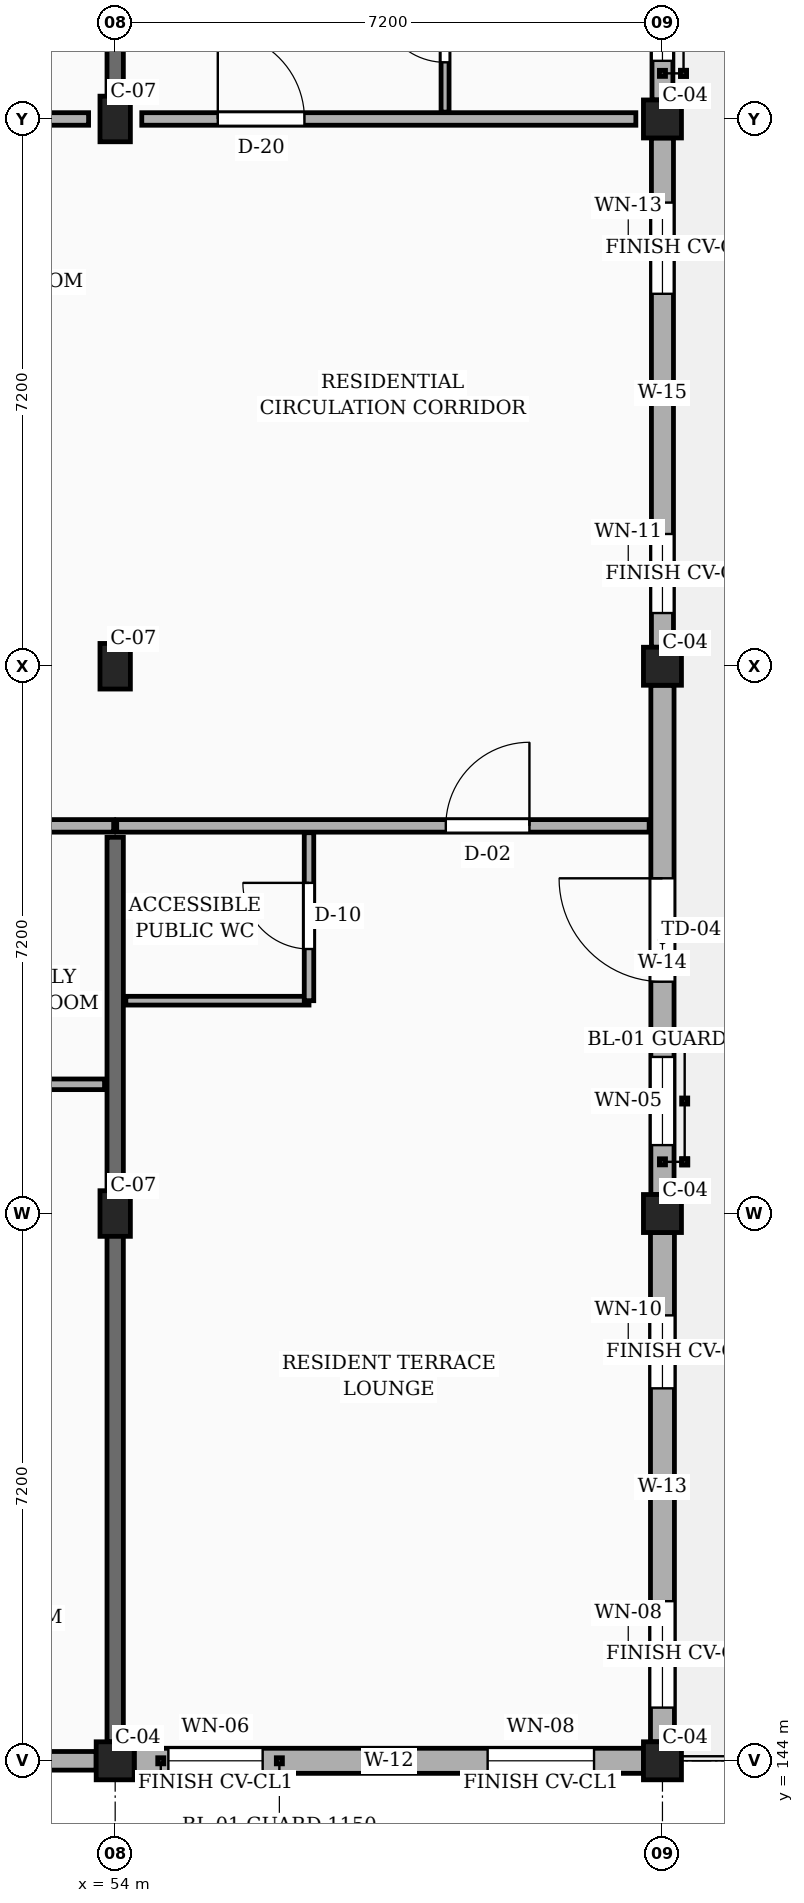
"""IFC4 building model, lengths in metres.
Left out: names, types, materials, properties, quantities, classifications, styles, units other than length and angle.
Written with IfcOpenShell. Run it as: python <this file> out.ifc"""

import sys

from ifc_helpers import new_model, si_unit, direction, frame, frame_2d, origin, origin_2d, place, context, subcontext, project, spatial, rectangle, extrude, element, fill, save


model = new_model("IFC4")
c1 = context("Model", 3, precision=1e-05, world=origin(), true_north=direction((0.0, 1.0)))
c2 = subcontext(c1, "Body", "Model", "MODEL_VIEW")
j1 = project(units=[si_unit("LENGTHUNIT", "METRE"), si_unit("PLANEANGLEUNIT", "RADIAN")], contexts=[c1])
p1 = place(None, origin())
s1 = spatial("IfcSite", under=j1, at=p1, CompositionType="ELEMENT")
p2 = place(p1, origin())
s2 = spatial("IfcBuilding", under=s1, at=p2, CompositionType="ELEMENT")
p3 = place(p2, frame((0.0, 0.0, 26.55)))
s3 = spatial("IfcBuildingStorey", under=s2, at=p3, CompositionType="ELEMENT", Elevation=26.55)
p4 = place(p3, frame((54.0, 144.0, 0.0), z_axis=(0.0, 0.0, 1.0), x_axis=(1.0, 0.0, 0.0)))
e1 = element("IfcColumn", 1, at=p4, inside=s3, PredefinedType="COLUMN", context=c2, shape_type="SweptSolid", body=[
    extrude(rectangle(XDim=0.5, YDim=0.5, at=origin_2d()), origin(), (0.0, 0.0, 1.0), 3.15),
])
for number, where, z_axis, x_axis in (
    (2, (54.0, 151.2, 0.0), (0.0, 0.0, 1.0), (1.0, 0.0, 0.0)),
    (3, (54.0, 158.4, 0.0), (0.0, 0.0, 1.0), (1.0, 0.0, 0.0)),
    (4, (54.0, 165.6, 0.0), (0.0, 0.0, 1.0), (1.0, 0.0, 0.0)),
):
    element("IfcColumn", number, at=place(p3, frame(where, z_axis=z_axis, x_axis=x_axis)), inside=s3, PredefinedType="COLUMN", context=c2, shape_type="SweptSolid", body=[
        extrude(rectangle(XDim=0.4, YDim=0.6, at=origin_2d()), origin(), (0.0, 0.0, 1.0), 3.15),
    ])
for number, where, z_axis, x_axis in (
    (5, (61.2, 144.0, 0.0), (0.0, 0.0, 1.0), (1.0, 0.0, 0.0)),
    (6, (61.2, 151.2, 0.0), (0.0, 0.0, 1.0), (1.0, 0.0, 0.0)),
    (7, (61.2, 158.4, 0.0), (0.0, 0.0, 1.0), (1.0, 0.0, 0.0)),
    (8, (61.2, 165.6, 0.0), (0.0, 0.0, 1.0), (1.0, 0.0, 0.0)),
):
    element("IfcColumn", number, at=place(p3, frame(where, z_axis=z_axis, x_axis=x_axis)), inside=s3, PredefinedType="COLUMN", context=c2, shape_type="SweptSolid", body=[
        extrude(rectangle(XDim=0.5, YDim=0.5, at=origin_2d()), origin(), (0.0, 0.0, 1.0), 3.15),
    ])
p5 = place(p3, frame((54.0, 144.25, 0.0), z_axis=(0.0, 0.0, 1.0), x_axis=(0.0, 1.0, 0.0)))
e9 = element("IfcWall", 9, at=p5, inside=s3, PredefinedType="SOLIDWALL", context=c2, shape_type="SweptSolid", body=[
    extrude(rectangle(XDim=11.9, YDim=0.215, at=frame_2d((5.95, 0.0))), origin(), (0.0, 0.0, 1.0), 2.185),
])
p6 = place(p3, frame((54.0, 165.9, 0.0), z_axis=(0.0, 0.0, 1.0), x_axis=(0.0, 1.0, 0.0)))
e10 = element("IfcWall", 10, at=p6, inside=s3, PredefinedType="SOLIDWALL", context=c2, shape_type="SweptSolid", body=[
    extrude(rectangle(XDim=6.65, YDim=0.215, at=frame_2d((3.325, 0.0))), origin(), (0.0, 0.0, 1.0), 2.185),
])
p7 = place(p3, frame((49.82, 144.0, 0.0), z_axis=(0.0, 0.0, 1.0), x_axis=(1.0, 0.0, 0.0)))
e11 = element("IfcWall", 11, at=p7, inside=s3, PredefinedType="SOLIDWALL", context=c2, shape_type="SweptSolid", body=[
    extrude(rectangle(XDim=3.93, YDim=0.245, at=frame_2d((1.965, 0.0))), origin(), (0.0, 0.0, 1.0), 2.455),
])
p8 = place(p7, frame((1.695, 0.0, 0.78)))
e12 = element("IfcOpeningElement", 12, at=p8, cuts=e11, PredefinedType="OPENING", context=c2, shape_type="SweptSolid", body=[
    extrude(rectangle(XDim=1.16, YDim=1.15, at=frame_2d((0.58, 0.575))), frame((0.0, 0.133, 0.0), z_axis=(0.0, -1.0, 0.0), x_axis=(1.0, 0.0, 0.0)), (0.0, 0.0, 1.0), 0.265),
])
p9 = place(p3, frame((54.25, 144.0, 0.0), z_axis=(0.0, 0.0, 1.0), x_axis=(1.0, 0.0, 0.0)))
e13 = element("IfcWall", 13, at=p9, inside=s3, PredefinedType="SOLIDWALL", context=c2, shape_type="SweptSolid", body=[
    extrude(rectangle(XDim=6.7, YDim=0.33, at=frame_2d((3.35, 0.0))), origin(), (0.0, 0.0, 1.0), 2.455),
])
p10 = place(p9, frame((0.45, 0.0, 0.78)))
e14 = element("IfcOpeningElement", 14, at=p10, cuts=e13, PredefinedType="OPENING", context=c2, shape_type="SweptSolid", body=[
    extrude(rectangle(XDim=1.24, YDim=1.15, at=frame_2d((0.62, 0.575))), frame((0.0, 0.175, 0.0), z_axis=(0.0, -1.0, 0.0), x_axis=(1.0, 0.0, 0.0)), (0.0, 0.0, 1.0), 0.35),
])
p11 = place(p9, frame((4.65, 0.0, 0.78)))
e15 = element("IfcOpeningElement", 15, at=p11, cuts=e13, PredefinedType="OPENING", context=c2, shape_type="SweptSolid", body=[
    extrude(rectangle(XDim=1.4, YDim=1.15, at=frame_2d((0.7, 0.575))), frame((0.0, 0.175, 0.0), z_axis=(0.0, -1.0, 0.0), x_axis=(1.0, 0.0, 0.0)), (0.0, 0.0, 1.0), 0.35),
])
p12 = place(p3, frame((61.2, 144.25, 0.0), z_axis=(0.0, 0.0, 1.0), x_axis=(0.0, 1.0, 0.0)))
e16 = element("IfcWall", 16, at=p12, inside=s3, PredefinedType="SOLIDWALL", context=c2, shape_type="SweptSolid", body=[
    extrude(rectangle(XDim=6.7, YDim=0.315, at=frame_2d((3.35, 0.0))), origin(), (0.0, 0.0, 1.0), 2.455),
])
p13 = place(p12, frame((0.45, 0.0, 0.78)))
e17 = element("IfcOpeningElement", 17, at=p13, cuts=e16, PredefinedType="OPENING", context=c2, shape_type="SweptSolid", body=[
    extrude(rectangle(XDim=1.4, YDim=1.15, at=frame_2d((0.7, 0.575))), frame((0.0, 0.167, 0.0), z_axis=(0.0, -1.0, 0.0), x_axis=(1.0, 0.0, 0.0)), (0.0, 0.0, 1.0), 0.335),
])
p14 = place(p12, frame((4.65, 0.0, 0.78)))
e18 = element("IfcOpeningElement", 18, at=p14, cuts=e16, PredefinedType="OPENING", context=c2, shape_type="SweptSolid", body=[
    extrude(rectangle(XDim=0.96, YDim=1.26, at=frame_2d((0.48, 0.63))), frame((0.0, 0.167, 0.0), z_axis=(0.0, -1.0, 0.0), x_axis=(1.0, 0.0, 0.0)), (0.0, 0.0, 1.0), 0.335),
])
p15 = place(p3, frame((61.2, 151.45, 0.0), z_axis=(0.0, 0.0, 1.0), x_axis=(0.0, 1.0, 0.0)))
e19 = element("IfcWall", 19, at=p15, inside=s3, PredefinedType="SOLIDWALL", context=c2, shape_type="SweptSolid", body=[
    extrude(rectangle(XDim=6.7, YDim=0.305, at=frame_2d((3.35, 0.0))), origin(), (0.0, 0.0, 1.0), 2.455),
])
p16 = place(p15, frame((2.8, 0.0, 0.0)))
e20 = element("IfcOpeningElement", 20, at=p16, cuts=e19, PredefinedType="OPENING", context=c2, shape_type="SweptSolid", body=[
    extrude(rectangle(XDim=1.36, YDim=2.12, at=frame_2d((0.68, 1.06))), frame((0.0, 0.163, 0.0), z_axis=(0.0, -1.0, 0.0), x_axis=(1.0, 0.0, 0.0)), (0.0, 0.0, 1.0), 0.325),
])
p17 = place(p15, frame((0.65, 0.0, 0.78)))
e21 = element("IfcOpeningElement", 21, at=p17, cuts=e19, PredefinedType="OPENING", context=c2, shape_type="SweptSolid", body=[
    extrude(rectangle(XDim=1.16, YDim=1.15, at=frame_2d((0.58, 0.575))), frame((0.0, 0.163, 0.0), z_axis=(0.0, -1.0, 0.0), x_axis=(1.0, 0.0, 0.0)), (0.0, 0.0, 1.0), 0.325),
])
p18 = place(p3, frame((61.2, 158.65, 0.0), z_axis=(0.0, 0.0, 1.0), x_axis=(0.0, 1.0, 0.0)))
e22 = element("IfcWall", 22, at=p18, inside=s3, PredefinedType="SOLIDWALL", context=c2, shape_type="SweptSolid", body=[
    extrude(rectangle(XDim=6.7, YDim=0.29, at=frame_2d((3.35, 0.0))), origin(), (0.0, 0.0, 1.0), 2.455),
])
p19 = place(p18, frame((0.45, 0.0, 0.78)))
e23 = element("IfcOpeningElement", 23, at=p19, cuts=e22, PredefinedType="OPENING", context=c2, shape_type="SweptSolid", body=[
    extrude(rectangle(XDim=1.04, YDim=1.26, at=frame_2d((0.52, 0.63))), frame((0.0, 0.155, 0.0), z_axis=(0.0, -1.0, 0.0), x_axis=(1.0, 0.0, 0.0)), (0.0, 0.0, 1.0), 0.31),
])
p20 = place(p18, frame((4.65, 0.0, 0.78)))
e24 = element("IfcOpeningElement", 24, at=p20, cuts=e22, PredefinedType="OPENING", context=c2, shape_type="SweptSolid", body=[
    extrude(rectangle(XDim=1.2, YDim=1.26, at=frame_2d((0.6, 0.63))), frame((0.0, 0.155, 0.0), z_axis=(0.0, -1.0, 0.0), x_axis=(1.0, 0.0, 0.0)), (0.0, 0.0, 1.0), 0.31),
])
p21 = place(p3, frame((61.2, 165.85, 0.0), z_axis=(0.0, 0.0, 1.0), x_axis=(0.0, 1.0, 0.0)))
e25 = element("IfcWall", 25, at=p21, inside=s3, PredefinedType="SOLIDWALL", context=c2, shape_type="SweptSolid", body=[
    extrude(rectangle(XDim=6.7, YDim=0.275, at=frame_2d((3.35, 0.0))), origin(), (0.0, 0.0, 1.0), 2.455),
])
p22 = place(p21, frame((0.515, 0.0, 0.78)))
e26 = element("IfcOpeningElement", 26, at=p22, cuts=e25, PredefinedType="OPENING", context=c2, shape_type="SweptSolid", body=[
    extrude(rectangle(XDim=1.2, YDim=1.26, at=frame_2d((0.6, 0.63))), frame((0.0, 0.147, 0.0), z_axis=(0.0, -1.0, 0.0), x_axis=(1.0, 0.0, 0.0)), (0.0, 0.0, 1.0), 0.295),
])
p23 = place(p21, frame((3.645, 0.0, 0.78)))
e27 = element("IfcOpeningElement", 27, at=p23, cuts=e25, PredefinedType="OPENING", context=c2, shape_type="SweptSolid", body=[
    extrude(rectangle(XDim=1.36, YDim=1.26, at=frame_2d((0.68, 0.63))), frame((0.0, 0.147, 0.0), z_axis=(0.0, -1.0, 0.0), x_axis=(1.0, 0.0, 0.0)), (0.0, 0.0, 1.0), 0.295),
])
p24 = place(p3, frame((46.82, 156.3, 0.0), z_axis=(0.0, 0.0, 1.0), x_axis=(1.0, 0.0, 0.0)))
e28 = element("IfcWall", 28, at=p24, inside=s3, PredefinedType="PARTITIONING", context=c2, shape_type="SweptSolid", body=[
    extrude(rectangle(XDim=7.16, YDim=0.165, at=frame_2d((3.58, 0.0))), origin(), (0.0, 0.0, 1.0), 2.32),
])
p25 = place(p24, frame((1.33, 0.0, 0.0)))
e29 = element("IfcOpeningElement", 29, at=p25, cuts=e28, PredefinedType="OPENING", context=c2, shape_type="SweptSolid", body=[
    extrude(rectangle(XDim=1.14, YDim=2.18, at=frame_2d((0.57, 1.09))), frame((0.0, 0.093, 0.0), z_axis=(0.0, -1.0, 0.0), x_axis=(1.0, 0.0, 0.0)), (0.0, 0.0, 1.0), 0.185),
])
p26 = place(p3, frame((54.02, 156.3, 0.0), z_axis=(0.0, 0.0, 1.0), x_axis=(1.0, 0.0, 0.0)))
e30 = element("IfcWall", 30, at=p26, inside=s3, PredefinedType="PARTITIONING", context=c2, shape_type="SweptSolid", body=[
    extrude(rectangle(XDim=7.005, YDim=0.165, at=frame_2d((3.502, 0.0))), origin(), (0.0, 0.0, 1.0), 2.32),
])
p27 = place(p26, frame((4.33, 0.0, 0.0)))
e31 = element("IfcOpeningElement", 31, at=p27, cuts=e30, PredefinedType="OPENING", context=c2, shape_type="SweptSolid", body=[
    extrude(rectangle(XDim=1.1, YDim=2.15, at=frame_2d((0.55, 1.075))), frame((0.0, 0.093, 0.0), z_axis=(0.0, -1.0, 0.0), x_axis=(1.0, 0.0, 0.0)), (0.0, 0.0, 1.0), 0.185),
])
p28 = place(p3, frame((47.15, 165.6, 0.0), z_axis=(0.0, 0.0, 1.0), x_axis=(1.0, 0.0, 0.0)))
e32 = element("IfcWall", 32, at=p28, inside=s3, PredefinedType="PARTITIONING", context=c2, shape_type="SweptSolid", body=[
    extrude(rectangle(XDim=6.5, YDim=0.165, at=frame_2d((3.25, 0.0))), origin(), (0.0, 0.0, 1.0), 2.32),
])
p29 = place(p28, frame((1.0, 0.0, 0.0)))
e33 = element("IfcOpeningElement", 33, at=p29, cuts=e32, PredefinedType="OPENING", context=c2, shape_type="SweptSolid", body=[
    extrude(rectangle(XDim=0.94, YDim=2.12, at=frame_2d((0.47, 1.06))), frame((0.0, 0.093, 0.0), z_axis=(0.0, -1.0, 0.0), x_axis=(1.0, 0.0, 0.0)), (0.0, 0.0, 1.0), 0.185),
])
p30 = place(p3, frame((54.35, 165.6, 0.0), z_axis=(0.0, 0.0, 1.0), x_axis=(1.0, 0.0, 0.0)))
e34 = element("IfcWall", 34, at=p30, inside=s3, PredefinedType="PARTITIONING", context=c2, shape_type="SweptSolid", body=[
    extrude(rectangle(XDim=6.5, YDim=0.165, at=frame_2d((3.25, 0.0))), origin(), (0.0, 0.0, 1.0), 2.32),
])
p31 = place(p30, frame((1.0, 0.0, 0.0)))
e35 = element("IfcOpeningElement", 35, at=p31, cuts=e34, PredefinedType="OPENING", context=c2, shape_type="SweptSolid", body=[
    extrude(rectangle(XDim=1.14, YDim=2.18, at=frame_2d((0.57, 1.09))), frame((0.0, 0.093, 0.0), z_axis=(0.0, -1.0, 0.0), x_axis=(1.0, 0.0, 0.0)), (0.0, 0.0, 1.0), 0.185),
])
p32 = place(p3, frame((46.94, 152.9, 0.0), z_axis=(0.0, 0.0, 1.0), x_axis=(1.0, 0.0, 0.0)))
e36 = element("IfcWall", 36, at=p32, inside=s3, PredefinedType="PARTITIONING", context=c2, shape_type="SweptSolid", body=[
    extrude(rectangle(XDim=6.92, YDim=0.14, at=frame_2d((3.46, 0.0))), origin(), (0.0, 0.0, 1.0), 2.32),
])
p33 = place(p32, frame((1.31, 0.0, 0.0)))
e37 = element("IfcOpeningElement", 37, at=p33, cuts=e36, PredefinedType="OPENING", context=c2, shape_type="SweptSolid", body=[
    extrude(rectangle(XDim=0.95, YDim=2.1, at=frame_2d((0.475, 1.05))), frame((0.0, 0.08, 0.0), z_axis=(0.0, -1.0, 0.0), x_axis=(1.0, 0.0, 0.0)), (0.0, 0.0, 1.0), 0.16),
])
p34 = place(p3, frame((54.14, 154.0, 0.0), z_axis=(0.0, 0.0, 1.0), x_axis=(1.0, 0.0, 0.0)))
e38 = element("IfcWall", 38, at=p34, inside=s3, PredefinedType="PARTITIONING", context=c2, shape_type="SweptSolid", body=[
    extrude(rectangle(XDim=2.41, YDim=0.115, at=frame_2d((1.205, 0.0))), origin(), (0.0, 0.0, 1.0), 2.32),
])
p35 = place(p3, frame((56.55, 154.0, 0.0), z_axis=(0.0, 0.0, 1.0), x_axis=(0.0, 1.0, 0.0)))
e39 = element("IfcWall", 39, at=p35, inside=s3, PredefinedType="PARTITIONING", context=c2, shape_type="SweptSolid", body=[
    extrude(rectangle(XDim=2.21, YDim=0.125, at=frame_2d((1.105, 0.0))), origin(), (0.0, 0.0, 1.0), 2.32),
])
p36 = place(p35, frame((0.68, 0.0, 0.0)))
e40 = element("IfcOpeningElement", 40, at=p36, cuts=e39, PredefinedType="OPENING", context=c2, shape_type="SweptSolid", body=[
    extrude(rectangle(XDim=0.87, YDim=2.05, at=frame_2d((0.435, 1.025))), frame((0.0, 0.073, 0.0), z_axis=(0.0, -1.0, 0.0), x_axis=(1.0, 0.0, 0.0)), (0.0, 0.0, 1.0), 0.145),
])
p37 = place(p3, frame((58.34, 165.69, 0.0), z_axis=(0.0, 0.0, 1.0), x_axis=(0.0, 1.0, 0.0)))
e41 = element("IfcWall", 41, at=p37, inside=s3, PredefinedType="PARTITIONING", context=c2, shape_type="SweptSolid", body=[
    extrude(rectangle(XDim=2.18, YDim=0.105, at=frame_2d((1.09, 0.0))), origin(), (0.0, 0.0, 1.0), 2.32),
])
p38 = place(p37, frame((0.655, 0.0, 0.0)))
e42 = element("IfcOpeningElement", 42, at=p38, cuts=e41, PredefinedType="OPENING", context=c2, shape_type="SweptSolid", body=[
    extrude(rectangle(XDim=0.87, YDim=2.05, at=frame_2d((0.435, 1.025))), frame((0.0, 0.062, 0.0), z_axis=(0.0, -1.0, 0.0), x_axis=(1.0, 0.0, 0.0)), (0.0, 0.0, 1.0), 0.125),
])
p39 = place(p10, origin())
e43 = element("IfcWindow", 43, at=p39, inside=s3, PartitioningType="SINGLE_PANEL", PredefinedType="WINDOW", context=c2, shape_type="SweptSolid", body=[
    extrude(rectangle(XDim=1.24, YDim=1.15, at=frame_2d((0.62, 0.575))), frame((0.0, 0.03, 0.0), z_axis=(0.0, -1.0, 0.0), x_axis=(1.0, 0.0, 0.0)), (0.0, 0.0, 1.0), 0.06),
])
fill(e14, e43)
p40 = place(p11, origin())
e44 = element("IfcWindow", 44, at=p40, inside=s3, PartitioningType="SINGLE_PANEL", PredefinedType="WINDOW", context=c2, shape_type="SweptSolid", body=[
    extrude(rectangle(XDim=1.4, YDim=1.15, at=frame_2d((0.7, 0.575))), frame((0.0, 0.03, 0.0), z_axis=(0.0, -1.0, 0.0), x_axis=(1.0, 0.0, 0.0)), (0.0, 0.0, 1.0), 0.06),
])
fill(e15, e44)
p41 = place(p13, origin())
e45 = element("IfcWindow", 45, at=p41, inside=s3, PartitioningType="SINGLE_PANEL", PredefinedType="WINDOW", context=c2, shape_type="SweptSolid", body=[
    extrude(rectangle(XDim=1.4, YDim=1.15, at=frame_2d((0.7, 0.575))), frame((0.0, 0.03, 0.0), z_axis=(0.0, -1.0, 0.0), x_axis=(1.0, 0.0, 0.0)), (0.0, 0.0, 1.0), 0.06),
])
fill(e17, e45)
p42 = place(p14, origin())
e46 = element("IfcWindow", 46, at=p42, inside=s3, PartitioningType="SINGLE_PANEL", PredefinedType="WINDOW", context=c2, shape_type="SweptSolid", body=[
    extrude(rectangle(XDim=0.96, YDim=1.26, at=frame_2d((0.48, 0.63))), frame((0.0, 0.03, 0.0), z_axis=(0.0, -1.0, 0.0), x_axis=(1.0, 0.0, 0.0)), (0.0, 0.0, 1.0), 0.06),
])
fill(e18, e46)
p43 = place(p16, frame((1.36, 0.0, 0.0), z_axis=(0.0, 0.0, 1.0), x_axis=(-1.0, 0.0, 0.0)))
e47 = element("IfcDoor", 47, at=p43, inside=s3, OperationType="SINGLE_SWING_RIGHT", PredefinedType="DOOR", context=c2, shape_type="SweptSolid", body=[
    extrude(rectangle(XDim=1.36, YDim=2.12, at=frame_2d((0.68, 1.06))), frame((0.0, 0.025, 0.0), z_axis=(0.0, -1.0, 0.0), x_axis=(1.0, 0.0, 0.0)), (0.0, 0.0, 1.0), 0.05),
])
fill(e20, e47)
p44 = place(p17, origin())
e48 = element("IfcWindow", 48, at=p44, inside=s3, PartitioningType="SINGLE_PANEL", PredefinedType="WINDOW", context=c2, shape_type="SweptSolid", body=[
    extrude(rectangle(XDim=1.16, YDim=1.15, at=frame_2d((0.58, 0.575))), frame((0.0, 0.03, 0.0), z_axis=(0.0, -1.0, 0.0), x_axis=(1.0, 0.0, 0.0)), (0.0, 0.0, 1.0), 0.06),
])
fill(e21, e48)
p45 = place(p19, origin())
e49 = element("IfcWindow", 49, at=p45, inside=s3, PartitioningType="SINGLE_PANEL", PredefinedType="WINDOW", context=c2, shape_type="SweptSolid", body=[
    extrude(rectangle(XDim=1.04, YDim=1.26, at=frame_2d((0.52, 0.63))), frame((0.0, 0.03, 0.0), z_axis=(0.0, -1.0, 0.0), x_axis=(1.0, 0.0, 0.0)), (0.0, 0.0, 1.0), 0.06),
])
fill(e23, e49)
p46 = place(p20, origin())
e50 = element("IfcWindow", 50, at=p46, inside=s3, PartitioningType="SINGLE_PANEL", PredefinedType="WINDOW", context=c2, shape_type="SweptSolid", body=[
    extrude(rectangle(XDim=1.2, YDim=1.26, at=frame_2d((0.6, 0.63))), frame((0.0, 0.03, 0.0), z_axis=(0.0, -1.0, 0.0), x_axis=(1.0, 0.0, 0.0)), (0.0, 0.0, 1.0), 0.06),
])
fill(e24, e50)
p47 = place(p22, origin())
e51 = element("IfcWindow", 51, at=p47, inside=s3, PartitioningType="SINGLE_PANEL", PredefinedType="WINDOW", context=c2, shape_type="SweptSolid", body=[
    extrude(rectangle(XDim=1.2, YDim=1.26, at=frame_2d((0.6, 0.63))), frame((0.0, 0.03, 0.0), z_axis=(0.0, -1.0, 0.0), x_axis=(1.0, 0.0, 0.0)), (0.0, 0.0, 1.0), 0.06),
])
fill(e26, e51)
p48 = place(p27, origin())
e52 = element("IfcDoor", 52, at=p48, inside=s3, OperationType="SINGLE_SWING_RIGHT", PredefinedType="DOOR", context=c2, shape_type="SweptSolid", body=[
    extrude(rectangle(XDim=1.1, YDim=2.15, at=frame_2d((0.55, 1.075))), frame((0.0, 0.025, 0.0), z_axis=(0.0, -1.0, 0.0), x_axis=(1.0, 0.0, 0.0)), (0.0, 0.0, 1.0), 0.05),
])
fill(e31, e52)
p49 = place(p31, origin())
e53 = element("IfcDoor", 53, at=p49, inside=s3, OperationType="SINGLE_SWING_LEFT", PredefinedType="DOOR", context=c2, shape_type="SweptSolid", body=[
    extrude(rectangle(XDim=1.14, YDim=2.18, at=frame_2d((0.57, 1.09))), frame((0.0, 0.025, 0.0), z_axis=(0.0, -1.0, 0.0), x_axis=(1.0, 0.0, 0.0)), (0.0, 0.0, 1.0), 0.05),
])
fill(e35, e53)
p50 = place(p36, origin())
e54 = element("IfcDoor", 54, at=p50, inside=s3, OperationType="SINGLE_SWING_RIGHT", PredefinedType="DOOR", context=c2, shape_type="SweptSolid", body=[
    extrude(rectangle(XDim=0.87, YDim=2.05, at=frame_2d((0.435, 1.025))), frame((0.0, 0.025, 0.0), z_axis=(0.0, -1.0, 0.0), x_axis=(1.0, 0.0, 0.0)), (0.0, 0.0, 1.0), 0.05),
])
fill(e40, e54)
p51 = place(p38, origin())
e55 = element("IfcDoor", 55, at=p51, inside=s3, OperationType="SINGLE_SWING_RIGHT", PredefinedType="DOOR", context=c2, shape_type="SweptSolid", body=[
    extrude(rectangle(XDim=0.87, YDim=2.05, at=frame_2d((0.435, 1.025))), frame((0.0, 0.025, 0.0), z_axis=(0.0, -1.0, 0.0), x_axis=(1.0, 0.0, 0.0)), (0.0, 0.0, 1.0), 0.05),
])
fill(e42, e55)
save(model, sys.argv[1])
